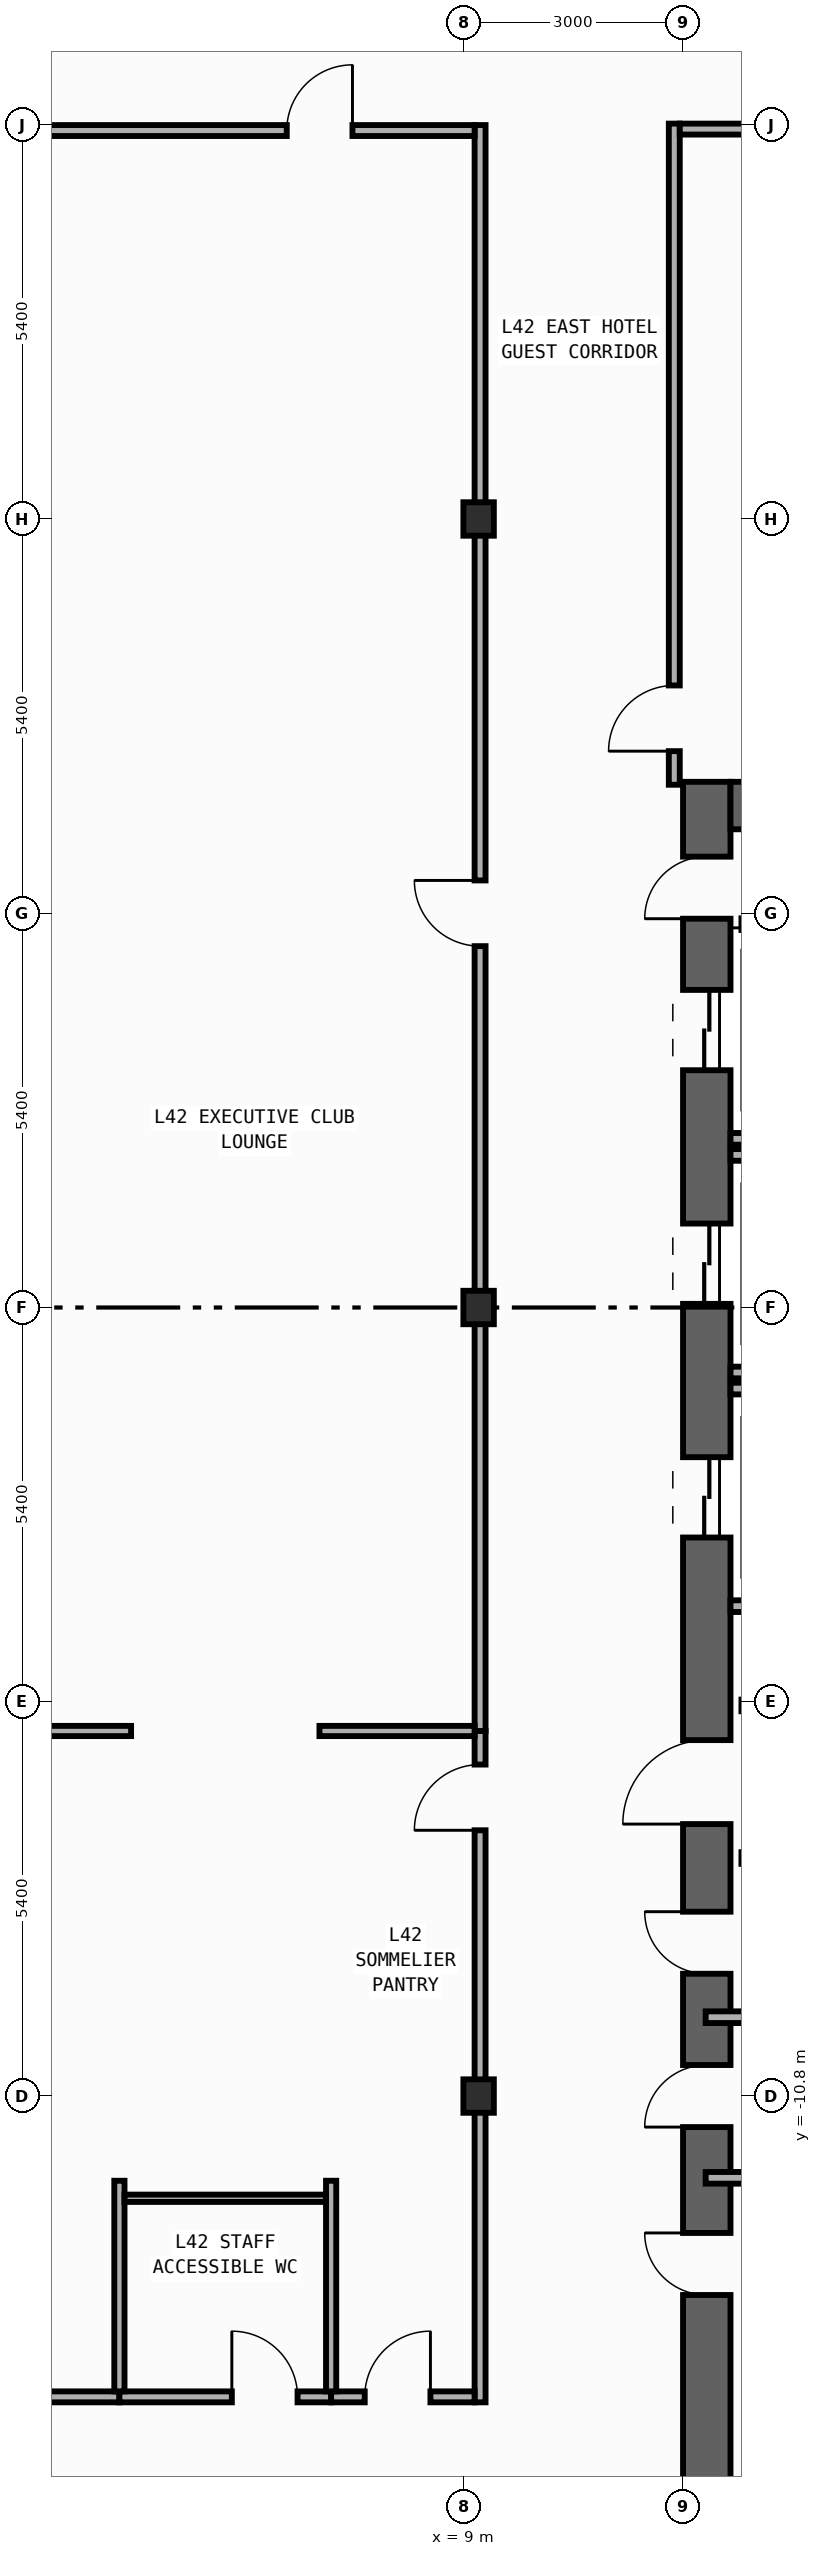
"""IFC4 building model, lengths in metres.
Left out: names, types, materials, properties, quantities, classifications, styles, units other than length and angle.
Written with IfcOpenShell. Run it as: python <this file> out.ifc"""

import sys

from ifc_helpers import new_model, si_unit, direction, frame, frame_2d, origin, origin_2d, place, context, subcontext, project, spatial, rectangle, i_section, extrude, element, fill, save


model = new_model("IFC4")
c1 = context("Model", 3, precision=1e-05, world=origin(), true_north=direction((0.0, 1.0)))
c2 = subcontext(c1, "Body", "Model", "MODEL_VIEW")
j1 = project(units=[si_unit("LENGTHUNIT", "METRE"), si_unit("PLANEANGLEUNIT", "RADIAN")], contexts=[c1])
p1 = place(None, origin())
s1 = spatial("IfcSite", under=j1, at=p1, CompositionType="ELEMENT")
p2 = place(p1, origin())
s2 = spatial("IfcBuilding", under=s1, at=p2, CompositionType="ELEMENT")
p3 = place(p2, frame((0.0, 0.0, 184.0)))
s3 = spatial("IfcBuildingStorey", under=s2, at=p3, CompositionType="ELEMENT", Elevation=184.0)
p4 = place(p3, frame((12.325, -19.8, 0.0), z_axis=(0.0, 0.0, 1.0), x_axis=(0.0, 1.0, 0.0)))
e1 = element("IfcWall", 1, at=p4, inside=s3, PredefinedType="SHEAR", context=c2, shape_type="SweptSolid", body=[
    extrude(rectangle(XDim=27.0, YDim=0.65, at=frame_2d((13.5, 0.0))), origin(), (0.0, 0.0, 1.0), 3.54),
])
p5 = place(p4, frame((23.05, 0.0, 0.0)))
e2 = element("IfcOpeningElement", 2, at=p5, cuts=e1, PredefinedType="OPENING", context=c2, shape_type="SweptSolid", body=[
    extrude(rectangle(XDim=1.1, YDim=2.2, at=frame_2d((0.55, 1.1))), frame((0.0, 0.335, 0.0), z_axis=(0.0, -1.0, 0.0), x_axis=(1.0, 0.0, 0.0)), (0.0, 0.0, 1.0), 0.67),
])
p6 = place(p4, frame((19.85, 0.0, 0.0)))
e3 = element("IfcOpeningElement", 3, at=p6, cuts=e1, PredefinedType="OPENING", context=c2, shape_type="SweptSolid", body=[
    extrude(rectangle(XDim=1.1, YDim=2.2, at=frame_2d((0.55, 1.1))), frame((0.0, 0.335, 0.0), z_axis=(0.0, -1.0, 0.0), x_axis=(1.0, 0.0, 0.0)), (0.0, 0.0, 1.0), 0.67),
])
p7 = place(p4, frame((16.65, 0.0, 0.0)))
e4 = element("IfcOpeningElement", 4, at=p7, cuts=e1, PredefinedType="OPENING", context=c2, shape_type="SweptSolid", body=[
    extrude(rectangle(XDim=1.1, YDim=2.2, at=frame_2d((0.55, 1.1))), frame((0.0, 0.335, 0.0), z_axis=(0.0, -1.0, 0.0), x_axis=(1.0, 0.0, 0.0)), (0.0, 0.0, 1.0), 0.67),
])
p8 = place(p4, frame((6.275, 0.0, 0.0)))
e5 = element("IfcOpeningElement", 5, at=p8, cuts=e1, PredefinedType="OPENING", context=c2, shape_type="SweptSolid", body=[
    extrude(rectangle(XDim=0.85, YDim=2.1, at=frame_2d((0.425, 1.05))), frame((0.0, 0.335, 0.0), z_axis=(0.0, -1.0, 0.0), x_axis=(1.0, 0.0, 0.0)), (0.0, 0.0, 1.0), 0.67),
])
p9 = place(p4, frame((8.575, 0.0, 0.0)))
e6 = element("IfcOpeningElement", 6, at=p9, cuts=e1, PredefinedType="OPENING", context=c2, shape_type="SweptSolid", body=[
    extrude(rectangle(XDim=0.85, YDim=2.1, at=frame_2d((0.425, 1.05))), frame((0.0, 0.335, 0.0), z_axis=(0.0, -1.0, 0.0), x_axis=(1.0, 0.0, 0.0)), (0.0, 0.0, 1.0), 0.67),
])
p10 = place(p4, frame((10.675, 0.0, 0.0)))
e7 = element("IfcOpeningElement", 7, at=p10, cuts=e1, PredefinedType="OPENING", context=c2, shape_type="SweptSolid", body=[
    extrude(rectangle(XDim=0.85, YDim=2.1, at=frame_2d((0.425, 1.05))), frame((0.0, 0.335, 0.0), z_axis=(0.0, -1.0, 0.0), x_axis=(1.0, 0.0, 0.0)), (0.0, 0.0, 1.0), 0.67),
])
p11 = place(p4, frame((12.725, 0.0, 0.0)))
e8 = element("IfcOpeningElement", 8, at=p11, cuts=e1, PredefinedType="OPENING", context=c2, shape_type="SweptSolid", body=[
    extrude(rectangle(XDim=1.15, YDim=2.2, at=frame_2d((0.575, 1.1))), frame((0.0, 0.335, 0.0), z_axis=(0.0, -1.0, 0.0), x_axis=(1.0, 0.0, 0.0)), (0.0, 0.0, 1.0), 0.67),
])
p12 = place(p4, frame((25.125, 0.0, 0.0)))
e9 = element("IfcOpeningElement", 9, at=p12, cuts=e1, PredefinedType="OPENING", context=c2, shape_type="SweptSolid", body=[
    extrude(rectangle(XDim=0.85, YDim=2.1, at=frame_2d((0.425, 1.05))), frame((0.0, 0.335, 0.0), z_axis=(0.0, -1.0, 0.0), x_axis=(1.0, 0.0, 0.0)), (0.0, 0.0, 1.0), 0.67),
])
p13 = place(p3, frame((12.65, 6.875, 0.0), z_axis=(0.0, 0.0, 1.0), x_axis=(1.0, 0.0, 0.0)))
e10 = element("IfcWall", 10, at=p13, inside=s3, PredefinedType="SHEAR", context=c2, shape_type="SweptSolid", body=[
    extrude(rectangle(XDim=7.1, YDim=0.65, at=frame_2d((3.55, 0.0))), origin(), (0.0, 0.0, 1.0), 3.54),
])
for number, where, z_axis, x_axis in (
    (11, (9.2, -10.8, 0.0), (0.0, 0.0, 1.0), (1.0, 0.0, 0.0)),
    (12, (9.2, 0.0, 0.0), (0.0, 0.0, 1.0), (1.0, 0.0, 0.0)),
    (13, (9.2, 10.8, 0.0), (0.0, 0.0, 1.0), (1.0, 0.0, 0.0)),
):
    element("IfcColumn", number, at=place(p3, frame(where, z_axis=z_axis, x_axis=x_axis)), inside=s3, PredefinedType="COLUMN", context=c2, shape_type="SweptSolid", body=[
        extrude(i_section(OverallWidth=0.417, OverallDepth=0.458, WebThickness=0.03, FlangeThickness=0.05, FilletRadius=0.022, at=origin_2d()), origin(), (0.0, 0.0, 1.0), 3.8),
    ])
for number, where, z_axis, x_axis in (
    (14, (12.65, 2.31, 0.0), (0.0, 0.0, 1.0), (1.0, 0.0, 0.0)),
    (15, (12.65, -0.89, 0.0), (0.0, 0.0, 1.0), (1.0, 0.0, 0.0)),
    (16, (12.65, 2.09, 0.0), (0.0, 0.0, 1.0), (1.0, 0.0, 0.0)),
    (17, (12.65, -4.09, 0.0), (0.0, 0.0, 1.0), (1.0, 0.0, 0.0)),
    (18, (12.65, -1.11, 0.0), (0.0, 0.0, 1.0), (1.0, 0.0, 0.0)),
):
    element("IfcWall", number, at=place(p3, frame(where, z_axis=z_axis, x_axis=x_axis)), inside=s3, PredefinedType="STANDARD", context=c2, shape_type="SweptSolid", body=[
        extrude(rectangle(XDim=2.34, YDim=0.16, at=frame_2d((1.17, 0.0))), origin(), (0.0, 0.0, 1.0), 3.54),
    ])
for number, where, z_axis, x_axis in (
    (19, (12.8, -5.45, 0.0), (0.0, 0.0, 1.0), (1.0, 0.0, 0.0)),
    (20, (12.8, -7.54, 0.0), (0.0, 0.0, 1.0), (1.0, 0.0, 0.0)),
    (21, (12.8, 5.25, 0.0), (0.0, 0.0, 1.0), (1.0, 0.0, 0.0)),
):
    element("IfcWall", number, at=place(p3, frame(where, z_axis=z_axis, x_axis=x_axis)), inside=s3, PredefinedType="STANDARD", context=c2, shape_type="SweptSolid", body=[
        extrude(rectangle(XDim=2.6, YDim=0.16, at=frame_2d((1.3, 0.0))), origin(), (0.0, 0.0, 1.0), 3.54),
    ])
for number, where, z_axis, x_axis in (
    (22, (12.31, -11.92, 0.0), (0.0, 0.0, 1.0), (1.0, 0.0, 0.0)),
    (23, (12.31, -9.72, 0.0), (0.0, 0.0, 1.0), (1.0, 0.0, 0.0)),
):
    element("IfcWall", number, at=place(p3, frame(where, z_axis=z_axis, x_axis=x_axis)), inside=s3, PredefinedType="PARTITIONING", context=c2, shape_type="SweptSolid", body=[
        extrude(rectangle(XDim=3.065, YDim=0.16, at=frame_2d((1.532, 0.0))), origin(), (0.0, 0.0, 1.0), 3.54),
    ])
p14 = place(p3, frame((9.22, -14.995, 0.0), z_axis=(0.0, 0.0, 1.0), x_axis=(0.0, 1.0, 0.0)))
e24 = element("IfcWall", 24, at=p14, inside=s3, PredefinedType="PARTITIONING", context=c2, shape_type="SweptSolid", body=[
    extrude(rectangle(XDim=9.195, YDim=0.15, at=frame_2d((4.598, 0.0))), origin(), (0.0, 0.0, 1.0), 2.952),
])
p15 = place(p14, frame((7.835, 0.0, 0.0)))
e25 = element("IfcOpeningElement", 25, at=p15, cuts=e24, PredefinedType="OPENING", context=c2, shape_type="SweptSolid", body=[
    extrude(rectangle(XDim=0.9, YDim=2.15, at=frame_2d((0.45, 1.075))), frame((0.0, 0.085, 0.0), z_axis=(0.0, -1.0, 0.0), x_axis=(1.0, 0.0, 0.0)), (0.0, 0.0, 1.0), 0.17),
])
p16 = place(p3, frame((9.22, -5.8, 0.0), z_axis=(0.0, 0.0, 1.0), x_axis=(0.0, 1.0, 0.0)))
e26 = element("IfcWall", 26, at=p16, inside=s3, PredefinedType="PARTITIONING", context=c2, shape_type="SweptSolid", body=[
    extrude(rectangle(XDim=21.995, YDim=0.15, at=frame_2d((10.998, 0.0))), origin(), (0.0, 0.0, 1.0), 2.952),
])
p17 = place(p16, frame((10.749, 0.0, 0.0)))
e27 = element("IfcOpeningElement", 27, at=p17, cuts=e26, PredefinedType="OPENING", context=c2, shape_type="SweptSolid", body=[
    extrude(rectangle(XDim=0.9, YDim=2.15, at=frame_2d((0.45, 1.075))), frame((0.0, 0.085, 0.0), z_axis=(0.0, -1.0, 0.0), x_axis=(1.0, 0.0, 0.0)), (0.0, 0.0, 1.0), 0.17),
])
p18 = place(p3, frame((11.88, 7.16, 0.0), z_axis=(0.0, 0.0, 1.0), x_axis=(0.0, 1.0, 0.0)))
e28 = element("IfcWall", 28, at=p18, inside=s3, PredefinedType="PARTITIONING", context=c2, shape_type="SweptSolid", body=[
    extrude(rectangle(XDim=9.055, YDim=0.15, at=frame_2d((4.528, 0.0))), origin(), (0.0, 0.0, 1.0), 3.54),
])
p19 = place(p18, frame((0.46, 0.0, 0.0)))
e29 = element("IfcOpeningElement", 29, at=p19, cuts=e28, PredefinedType="OPENING", context=c2, shape_type="SweptSolid", body=[
    extrude(rectangle(XDim=0.9, YDim=2.15, at=frame_2d((0.45, 1.075))), frame((0.0, 0.085, 0.0), z_axis=(0.0, -1.0, 0.0), x_axis=(1.0, 0.0, 0.0)), (0.0, 0.0, 1.0), 0.17),
])
p20 = place(p3, frame((3.08, 16.12, 0.0), z_axis=(0.0, 0.0, 1.0), x_axis=(1.0, 0.0, 0.0)))
e30 = element("IfcWall", 30, at=p20, inside=s3, PredefinedType="PARTITIONING", context=c2, shape_type="SweptSolid", body=[
    extrude(rectangle(XDim=6.065, YDim=0.15, at=frame_2d((3.032, 0.0))), origin(), (0.0, 0.0, 1.0), 3.54),
])
p21 = place(p20, frame((3.492, 0.0, 0.0)))
e31 = element("IfcOpeningElement", 31, at=p21, cuts=e30, PredefinedType="OPENING", context=c2, shape_type="SweptSolid", body=[
    extrude(rectangle(XDim=0.9, YDim=2.15, at=frame_2d((0.45, 1.075))), frame((0.0, 0.085, 0.0), z_axis=(0.0, -1.0, 0.0), x_axis=(1.0, 0.0, 0.0)), (0.0, 0.0, 1.0), 0.17),
])
p22 = place(p3, frame((11.955, 16.14, 0.0), z_axis=(0.0, 0.0, 1.0), x_axis=(1.0, 0.0, 0.0)))
e32 = element("IfcWall", 32, at=p22, inside=s3, PredefinedType="PARTITIONING", context=c2, shape_type="SweptSolid", body=[
    extrude(rectangle(XDim=10.5, YDim=0.15, at=frame_2d((5.25, 0.0))), origin(), (0.0, 0.0, 1.0), 3.54),
])
p23 = place(p22, frame((4.901, 0.0, 0.0)))
e33 = element("IfcOpeningElement", 33, at=p23, cuts=e32, PredefinedType="OPENING", context=c2, shape_type="SweptSolid", body=[
    extrude(rectangle(XDim=0.9, YDim=2.15, at=frame_2d((0.45, 1.075))), frame((0.0, 0.085, 0.0), z_axis=(0.0, -1.0, 0.0), x_axis=(1.0, 0.0, 0.0)), (0.0, 0.0, 1.0), 0.17),
])
p24 = place(p3, frame((-3.32, -14.92, 0.0), z_axis=(0.0, 0.0, 1.0), x_axis=(1.0, 0.0, 0.0)))
e34 = element("IfcWall", 34, at=p24, inside=s3, PredefinedType="PARTITIONING", context=c2, shape_type="SweptSolid", body=[
    extrude(rectangle(XDim=7.6, YDim=0.15, at=frame_2d((3.8, 0.0))), origin(), (0.0, 0.0, 1.0), 3.54),
])
p25 = place(p24, frame((0.667, 0.0, 0.0)))
e35 = element("IfcOpeningElement", 35, at=p25, cuts=e34, PredefinedType="OPENING", context=c2, shape_type="SweptSolid", body=[
    extrude(rectangle(XDim=0.9, YDim=2.15, at=frame_2d((0.45, 1.075))), frame((0.0, 0.085, 0.0), z_axis=(0.0, -1.0, 0.0), x_axis=(1.0, 0.0, 0.0)), (0.0, 0.0, 1.0), 0.17),
])
p26 = place(p3, frame((4.28, -14.92, 0.0), z_axis=(0.0, 0.0, 1.0), x_axis=(1.0, 0.0, 0.0)))
e36 = element("IfcWall", 36, at=p26, inside=s3, PredefinedType="PARTITIONING", context=c2, shape_type="SweptSolid", body=[
    extrude(rectangle(XDim=2.9, YDim=0.15, at=frame_2d((1.45, 0.0))), origin(), (0.0, 0.0, 1.0), 3.54),
])
p27 = place(p26, frame((1.54, 0.0, 0.0)))
e37 = element("IfcOpeningElement", 37, at=p27, cuts=e36, PredefinedType="OPENING", context=c2, shape_type="SweptSolid", body=[
    extrude(rectangle(XDim=0.9, YDim=2.15, at=frame_2d((0.45, 1.075))), frame((0.0, 0.085, 0.0), z_axis=(0.0, -1.0, 0.0), x_axis=(1.0, 0.0, 0.0)), (0.0, 0.0, 1.0), 0.17),
])
p28 = place(p3, frame((7.18, -14.92, 0.0), z_axis=(0.0, 0.0, 1.0), x_axis=(1.0, 0.0, 0.0)))
e38 = element("IfcWall", 38, at=p28, inside=s3, PredefinedType="PARTITIONING", context=c2, shape_type="SweptSolid", body=[
    extrude(rectangle(XDim=1.965, YDim=0.15, at=frame_2d((0.982, 0.0))), origin(), (0.0, 0.0, 1.0), 3.54),
])
p29 = place(p28, frame((0.46, 0.0, 0.0)))
e39 = element("IfcOpeningElement", 39, at=p29, cuts=e38, PredefinedType="OPENING", context=c2, shape_type="SweptSolid", body=[
    extrude(rectangle(XDim=0.9, YDim=2.15, at=frame_2d((0.45, 1.075))), frame((0.0, 0.085, 0.0), z_axis=(0.0, -1.0, 0.0), x_axis=(1.0, 0.0, 0.0)), (0.0, 0.0, 1.0), 0.17),
])
p30 = place(p3, frame((4.28, -14.845, 0.0), z_axis=(0.0, 0.0, 1.0), x_axis=(0.0, 1.0, 0.0)))
e40 = element("IfcWall", 40, at=p30, inside=s3, PredefinedType="PARTITIONING", context=c2, shape_type="SweptSolid", body=[
    extrude(rectangle(XDim=2.885, YDim=0.14, at=frame_2d((1.442, 0.0))), origin(), (0.0, 0.0, 1.0), 3.54),
])
p31 = place(p3, frame((3.08, -5.8, 0.0), z_axis=(0.0, 0.0, 1.0), x_axis=(1.0, 0.0, 0.0)))
e41 = element("IfcWall", 41, at=p31, inside=s3, PredefinedType="PARTITIONING", context=c2, shape_type="SweptSolid", body=[
    extrude(rectangle(XDim=1.36, YDim=0.14, at=frame_2d((0.68, 0.0))), origin(), (0.0, 0.0, 1.0), 3.54),
])
p32 = place(p3, frame((7.18, -14.845, 0.0), z_axis=(0.0, 0.0, 1.0), x_axis=(0.0, 1.0, 0.0)))
e42 = element("IfcWall", 42, at=p32, inside=s3, PredefinedType="PARTITIONING", context=c2, shape_type="SweptSolid", body=[
    extrude(rectangle(XDim=2.885, YDim=0.14, at=frame_2d((1.442, 0.0))), origin(), (0.0, 0.0, 1.0), 3.54),
])
p33 = place(p3, frame((7.02, -5.8, 0.0), z_axis=(0.0, 0.0, 1.0), x_axis=(1.0, 0.0, 0.0)))
e43 = element("IfcWall", 43, at=p33, inside=s3, PredefinedType="PARTITIONING", context=c2, shape_type="SweptSolid", body=[
    extrude(rectangle(XDim=2.125, YDim=0.14, at=frame_2d((1.062, 0.0))), origin(), (0.0, 0.0, 1.0), 3.54),
])
p34 = place(p3, frame((4.35, -12.2, 0.0), z_axis=(0.0, 0.0, 1.0), x_axis=(1.0, 0.0, 0.0)))
e44 = element("IfcWall", 44, at=p34, inside=s3, PredefinedType="PARTITIONING", context=c2, shape_type="SweptSolid", body=[
    extrude(rectangle(XDim=2.76, YDim=0.1, at=frame_2d((1.38, 0.0))), origin(), (0.0, 0.0, 1.0), 3.54),
])
p35 = place(p5, origin())
e45 = element("IfcDoor", 45, at=p35, inside=s3, OperationType="DOUBLE_DOOR_SLIDING", PredefinedType="DOOR", context=c2, shape_type="SweptSolid", body=[
    extrude(rectangle(XDim=1.1, YDim=2.2, at=frame_2d((0.55, 1.1))), frame((0.0, 0.025, 0.0), z_axis=(0.0, -1.0, 0.0), x_axis=(1.0, 0.0, 0.0)), (0.0, 0.0, 1.0), 0.05),
])
fill(e2, e45)
p36 = place(p6, origin())
e46 = element("IfcDoor", 46, at=p36, inside=s3, OperationType="DOUBLE_DOOR_SLIDING", PredefinedType="DOOR", context=c2, shape_type="SweptSolid", body=[
    extrude(rectangle(XDim=1.1, YDim=2.2, at=frame_2d((0.55, 1.1))), frame((0.0, 0.025, 0.0), z_axis=(0.0, -1.0, 0.0), x_axis=(1.0, 0.0, 0.0)), (0.0, 0.0, 1.0), 0.05),
])
fill(e3, e46)
p37 = place(p7, origin())
e47 = element("IfcDoor", 47, at=p37, inside=s3, OperationType="DOUBLE_DOOR_SLIDING", PredefinedType="DOOR", context=c2, shape_type="SweptSolid", body=[
    extrude(rectangle(XDim=1.1, YDim=2.2, at=frame_2d((0.55, 1.1))), frame((0.0, 0.025, 0.0), z_axis=(0.0, -1.0, 0.0), x_axis=(1.0, 0.0, 0.0)), (0.0, 0.0, 1.0), 0.05),
])
fill(e4, e47)
p38 = place(p8, origin())
e48 = element("IfcDoor", 48, at=p38, inside=s3, OperationType="SINGLE_SWING_RIGHT", PredefinedType="DOOR", context=c2, shape_type="SweptSolid", body=[
    extrude(rectangle(XDim=0.85, YDim=2.1, at=frame_2d((0.425, 1.05))), frame((0.0, 0.025, 0.0), z_axis=(0.0, -1.0, 0.0), x_axis=(1.0, 0.0, 0.0)), (0.0, 0.0, 1.0), 0.05),
])
fill(e5, e48)
p39 = place(p9, origin())
e49 = element("IfcDoor", 49, at=p39, inside=s3, OperationType="SINGLE_SWING_LEFT", PredefinedType="DOOR", context=c2, shape_type="SweptSolid", body=[
    extrude(rectangle(XDim=0.85, YDim=2.1, at=frame_2d((0.425, 1.05))), frame((0.0, 0.025, 0.0), z_axis=(0.0, -1.0, 0.0), x_axis=(1.0, 0.0, 0.0)), (0.0, 0.0, 1.0), 0.05),
])
fill(e6, e49)
p40 = place(p10, origin())
e50 = element("IfcDoor", 50, at=p40, inside=s3, OperationType="SINGLE_SWING_RIGHT", PredefinedType="DOOR", context=c2, shape_type="SweptSolid", body=[
    extrude(rectangle(XDim=0.85, YDim=2.1, at=frame_2d((0.425, 1.05))), frame((0.0, 0.025, 0.0), z_axis=(0.0, -1.0, 0.0), x_axis=(1.0, 0.0, 0.0)), (0.0, 0.0, 1.0), 0.05),
])
fill(e7, e50)
p41 = place(p11, origin())
e51 = element("IfcDoor", 51, at=p41, inside=s3, OperationType="SINGLE_SWING_LEFT", PredefinedType="DOOR", context=c2, shape_type="SweptSolid", body=[
    extrude(rectangle(XDim=1.15, YDim=2.2, at=frame_2d((0.575, 1.1))), frame((0.0, 0.025, 0.0), z_axis=(0.0, -1.0, 0.0), x_axis=(1.0, 0.0, 0.0)), (0.0, 0.0, 1.0), 0.05),
])
fill(e8, e51)
p42 = place(p12, origin())
e52 = element("IfcDoor", 52, at=p42, inside=s3, OperationType="SINGLE_SWING_LEFT", PredefinedType="DOOR", context=c2, shape_type="SweptSolid", body=[
    extrude(rectangle(XDim=0.85, YDim=2.1, at=frame_2d((0.425, 1.05))), frame((0.0, 0.025, 0.0), z_axis=(0.0, -1.0, 0.0), x_axis=(1.0, 0.0, 0.0)), (0.0, 0.0, 1.0), 0.05),
])
fill(e9, e52)
p43 = place(p15, origin())
e53 = element("IfcDoor", 53, at=p43, inside=s3, OperationType="SINGLE_SWING_LEFT", PredefinedType="DOOR", context=c2, shape_type="SweptSolid", body=[
    extrude(rectangle(XDim=0.9, YDim=2.15, at=frame_2d((0.45, 1.075))), frame((0.0, 0.025, 0.0), z_axis=(0.0, -1.0, 0.0), x_axis=(1.0, 0.0, 0.0)), (0.0, 0.0, 1.0), 0.05),
])
fill(e25, e53)
p44 = place(p17, origin())
e54 = element("IfcDoor", 54, at=p44, inside=s3, OperationType="SINGLE_SWING_RIGHT", PredefinedType="DOOR", context=c2, shape_type="SweptSolid", body=[
    extrude(rectangle(XDim=0.9, YDim=2.15, at=frame_2d((0.45, 1.075))), frame((0.0, 0.025, 0.0), z_axis=(0.0, -1.0, 0.0), x_axis=(1.0, 0.0, 0.0)), (0.0, 0.0, 1.0), 0.05),
])
fill(e27, e54)
p45 = place(p19, origin())
e55 = element("IfcDoor", 55, at=p45, inside=s3, OperationType="SINGLE_SWING_LEFT", PredefinedType="DOOR", context=c2, shape_type="SweptSolid", body=[
    extrude(rectangle(XDim=0.9, YDim=2.15, at=frame_2d((0.45, 1.075))), frame((0.0, 0.025, 0.0), z_axis=(0.0, -1.0, 0.0), x_axis=(1.0, 0.0, 0.0)), (0.0, 0.0, 1.0), 0.05),
])
fill(e29, e55)
p46 = place(p21, origin())
e56 = element("IfcDoor", 56, at=p46, inside=s3, OperationType="SINGLE_SWING_RIGHT", PredefinedType="DOOR", context=c2, shape_type="SweptSolid", body=[
    extrude(rectangle(XDim=0.9, YDim=2.15, at=frame_2d((0.45, 1.075))), frame((0.0, 0.025, 0.0), z_axis=(0.0, -1.0, 0.0), x_axis=(1.0, 0.0, 0.0)), (0.0, 0.0, 1.0), 0.05),
])
fill(e31, e56)
p47 = place(p27, origin())
e57 = element("IfcDoor", 57, at=p47, inside=s3, OperationType="SINGLE_SWING_LEFT", PredefinedType="DOOR", context=c2, shape_type="SweptSolid", body=[
    extrude(rectangle(XDim=0.9, YDim=2.15, at=frame_2d((0.45, 1.075))), frame((0.0, 0.025, 0.0), z_axis=(0.0, -1.0, 0.0), x_axis=(1.0, 0.0, 0.0)), (0.0, 0.0, 1.0), 0.05),
])
fill(e37, e57)
p48 = place(p29, origin())
e58 = element("IfcDoor", 58, at=p48, inside=s3, OperationType="SINGLE_SWING_RIGHT", PredefinedType="DOOR", context=c2, shape_type="SweptSolid", body=[
    extrude(rectangle(XDim=0.9, YDim=2.15, at=frame_2d((0.45, 1.075))), frame((0.0, 0.025, 0.0), z_axis=(0.0, -1.0, 0.0), x_axis=(1.0, 0.0, 0.0)), (0.0, 0.0, 1.0), 0.05),
])
fill(e39, e58)
save(model, sys.argv[1])
